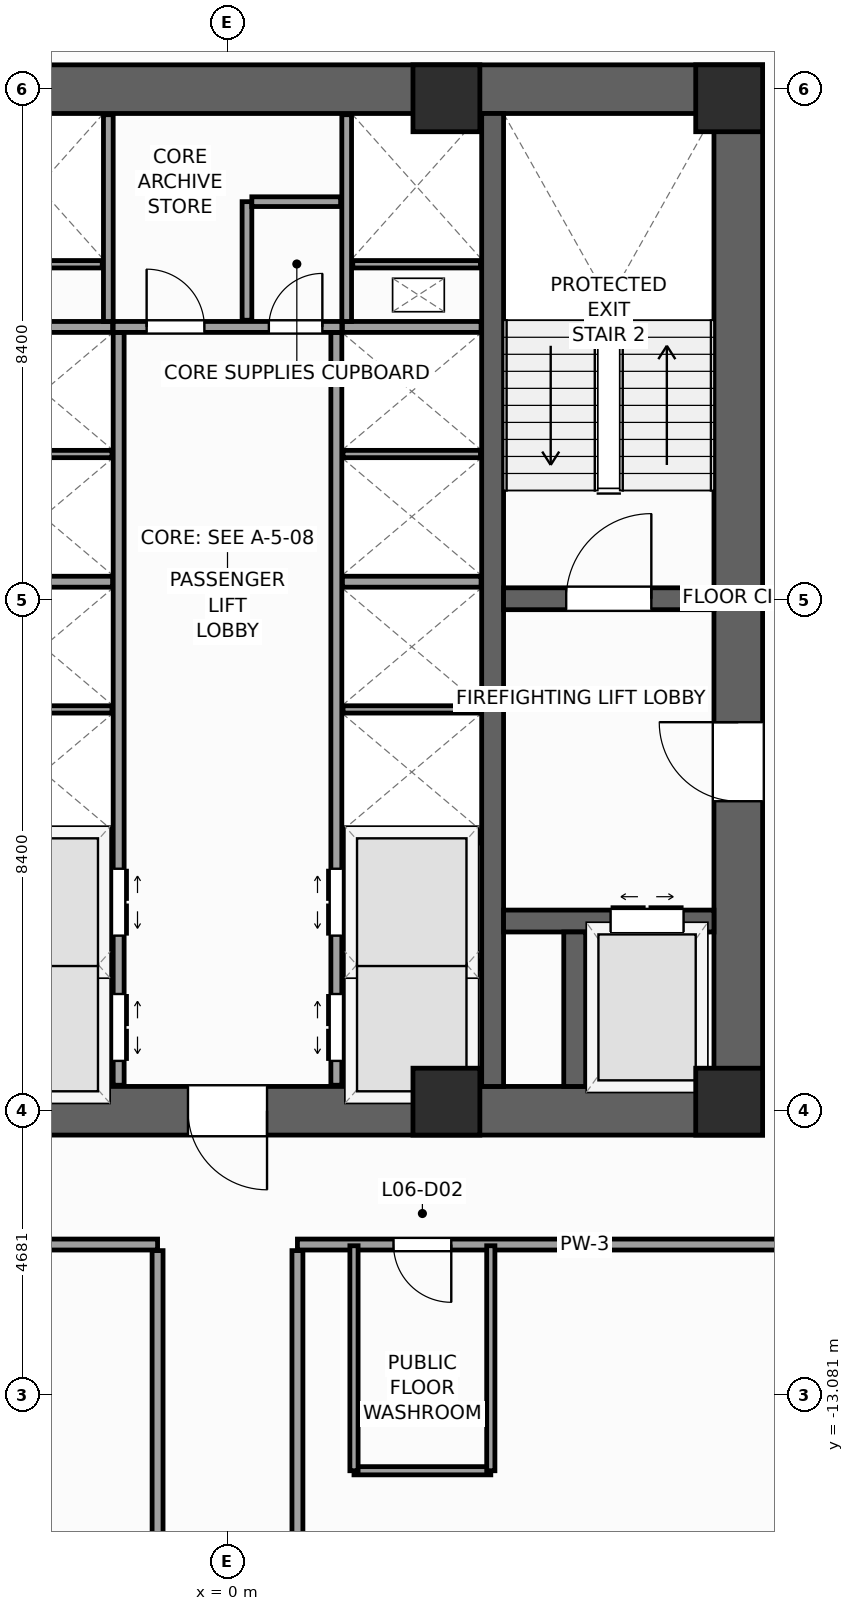
"""IFC4 building model, lengths in metres.
Left out: names, types, materials, properties, quantities, classifications, styles, units other than length and angle.
Written with IfcOpenShell. Run it as: python <this file> out.ifc"""

import sys

from ifc_helpers import new_model, si_unit, direction, frame, frame_2d, origin, origin_2d, place, context, subcontext, project, spatial, rectangle, extrude, source, transform, mapped, element, fill, save


model = new_model("IFC4")
c1 = context("Model", 3, precision=1e-05, world=origin(), true_north=direction((0.0, 1.0)))
c2 = subcontext(c1, "Body", "Model", "MODEL_VIEW")
j1 = project(units=[si_unit("LENGTHUNIT", "METRE"), si_unit("PLANEANGLEUNIT", "RADIAN")], contexts=[c1])
p1 = place(None, origin())
s1 = spatial("IfcSite", under=j1, at=p1, CompositionType="ELEMENT")
p2 = place(p1, origin())
s2 = spatial("IfcBuilding", under=s1, at=p2, CompositionType="ELEMENT")
p3 = place(p2, frame((0.0, 0.0, 30.0)))
s3 = spatial("IfcBuildingStorey", under=s2, at=p3, CompositionType="ELEMENT", Elevation=30.0)
p4 = place(p3, frame((-8.8, -8.4, 0.0), z_axis=(0.0, 0.0, 1.0), x_axis=(1.0, 0.0, 0.0)))
e1 = element("IfcWall", 1, at=p4, inside=s3, PredefinedType="SHEAR", context=c2, shape_type="SweptSolid", body=[
    extrude(rectangle(XDim=17.6, YDim=0.8, at=frame_2d((8.8, 0.0))), origin(), (0.0, 0.0, 1.0), 4.0),
])
p5 = place(p4, frame((8.15, 0.0, 0.0)))
e2 = element("IfcOpeningElement", 2, at=p5, cuts=e1, PredefinedType="OPENING", context=c2, shape_type="SweptSolid", body=[
    extrude(rectangle(XDim=1.3, YDim=2.2, at=frame_2d((0.65, 1.1))), frame((0.0, 0.41, 0.0), z_axis=(0.0, -1.0, 0.0), x_axis=(1.0, 0.0, 0.0)), (0.0, 0.0, 1.0), 0.82),
])
p6 = place(p3, frame((-8.8, 8.4, 0.0), z_axis=(0.0, 0.0, 1.0), x_axis=(1.0, 0.0, 0.0)))
e3 = element("IfcWall", 3, at=p6, inside=s3, PredefinedType="SHEAR", context=c2, shape_type="SweptSolid", body=[
    extrude(rectangle(XDim=17.6, YDim=0.8, at=frame_2d((8.8, 0.0))), origin(), (0.0, 0.0, 1.0), 4.0),
])
p7 = place(p3, frame((8.4, -8.0, 0.0), z_axis=(0.0, 0.0, 1.0), x_axis=(0.0, 1.0, 0.0)))
e4 = element("IfcWall", 4, at=p7, inside=s3, PredefinedType="SHEAR", context=c2, shape_type="SweptSolid", body=[
    extrude(rectangle(XDim=16.0, YDim=0.8, at=frame_2d((8.0, 0.0))), origin(), (0.0, 0.0, 1.0), 4.0),
])
p8 = place(p7, frame((4.69, 0.0, 0.0)))
e5 = element("IfcOpeningElement", 5, at=p8, cuts=e4, PredefinedType="OPENING", context=c2, shape_type="SweptSolid", body=[
    extrude(rectangle(XDim=1.3, YDim=2.2, at=frame_2d((0.65, 1.1))), frame((0.0, 0.41, 0.0), z_axis=(0.0, -1.0, 0.0), x_axis=(1.0, 0.0, 0.0)), (0.0, 0.0, 1.0), 0.82),
])
p9 = place(p3, frame((4.36, -8.0, 0.0), z_axis=(0.0, 0.0, 1.0), x_axis=(0.0, 1.0, 0.0)))
e6 = element("IfcWall", 6, at=p9, inside=s3, PredefinedType="SHEAR", context=c2, shape_type="SweptSolid", body=[
    extrude(rectangle(XDim=16.0, YDim=0.36, at=frame_2d((8.0, 0.0))), origin(), (0.0, 0.0, 1.0), 4.0),
])
p10 = place(p3, frame((4.54, 0.02, 0.0), z_axis=(0.0, 0.0, 1.0), x_axis=(1.0, 0.0, 0.0)))
e7 = element("IfcWall", 7, at=p10, inside=s3, PredefinedType="SHEAR", context=c2, shape_type="SweptSolid", body=[
    extrude(rectangle(XDim=3.46, YDim=0.36, at=frame_2d((1.73, 0.0))), origin(), (0.0, 0.0, 1.0), 4.0),
])
p11 = place(p10, frame((1.03, 0.0, 0.0)))
e8 = element("IfcOpeningElement", 8, at=p11, cuts=e7, PredefinedType="OPENING", context=c2, shape_type="SweptSolid", body=[
    extrude(rectangle(XDim=1.4, YDim=2.2, at=frame_2d((0.7, 1.1))), frame((0.0, 0.19, 0.0), z_axis=(0.0, -1.0, 0.0), x_axis=(1.0, 0.0, 0.0)), (0.0, 0.0, 1.0), 0.38),
])
p12 = place(p3, frame((4.54, -5.28, 0.0), z_axis=(0.0, 0.0, 1.0), x_axis=(1.0, 0.0, 0.0)))
e9 = element("IfcWall", 9, at=p12, inside=s3, PredefinedType="SHEAR", context=c2, shape_type="SweptSolid", body=[
    extrude(rectangle(XDim=3.46, YDim=0.36, at=frame_2d((1.73, 0.0))), origin(), (0.0, 0.0, 1.0), 4.0),
])
p13 = place(p12, frame((1.76, 0.0, 0.0)))
e10 = element("IfcOpeningElement", 10, at=p13, cuts=e9, PredefinedType="OPENING", context=c2, shape_type="SweptSolid", body=[
    extrude(rectangle(XDim=1.2, YDim=2.25, at=frame_2d((0.6, 1.125))), frame((0.0, 0.19, 0.0), z_axis=(0.0, -1.0, 0.0), x_axis=(1.0, 0.0, 0.0)), (0.0, 0.0, 1.0), 0.38),
])
p14 = place(p3, frame((5.71, -8.0, 0.0), z_axis=(0.0, 0.0, 1.0), x_axis=(0.0, 1.0, 0.0)))
e11 = element("IfcWall", 11, at=p14, inside=s3, PredefinedType="SHEAR", context=c2, shape_type="SweptSolid", body=[
    extrude(rectangle(XDim=2.54, YDim=0.36, at=frame_2d((1.27, 0.0))), origin(), (0.0, 0.0, 1.0), 4.0),
])
m1 = source(origin(), c2, "Body", "SweptSolid", [
    extrude(rectangle(XDim=1.1, YDim=1.1, at=origin_2d()), origin(), (0.0, 0.0, 1.0), 4.0),
])
for number, where, z_axis, x_axis in (
    (12, (8.25, -8.25, 0.0), (0.0, 0.0, 1.0), (1.0, 0.0, 0.0)),
    (13, (8.25, 8.25, 0.0), (0.0, 0.0, 1.0), (1.0, 0.0, 0.0)),
    (14, (3.6, -8.25, 0.0), (0.0, 0.0, 1.0), (1.0, 0.0, 0.0)),
    (15, (3.6, 8.25, 0.0), (0.0, 0.0, 1.0), (1.0, 0.0, 0.0)),
):
    element("IfcColumn", number, at=place(p3, frame(where, z_axis=z_axis, x_axis=x_axis)), inside=s3, PredefinedType="PILASTER", context=c2, shape_type="MappedRepresentation", body=[
        mapped(m1, transform((0.0, 0.0, 0.0), scale=1.0)),
    ])
p15 = place(p3, frame((-1.79, -7.98, 0.0), z_axis=(0.0, 0.0, 1.0), x_axis=(0.0, 1.0, 0.0)))
e16 = element("IfcWall", 16, at=p15, inside=s3, PredefinedType="PARTITIONING", context=c2, shape_type="SweptSolid", body=[
    extrude(rectangle(XDim=12.38, YDim=0.18, at=frame_2d((6.19, 0.0))), origin(), (0.0, 0.0, 1.0), 3.72),
])
p16 = place(p15, frame((0.4, 0.0, 0.0)))
e17 = element("IfcOpeningElement", 17, at=p16, cuts=e16, PredefinedType="OPENING", context=c2, shape_type="SweptSolid", body=[
    extrude(rectangle(XDim=1.1, YDim=2.2, at=frame_2d((0.55, 1.1))), frame((0.0, 0.1, 0.0), z_axis=(0.0, -1.0, 0.0), x_axis=(1.0, 0.0, 0.0)), (0.0, 0.0, 1.0), 0.2),
])
p17 = place(p15, frame((2.46, 0.0, 0.0)))
e18 = element("IfcOpeningElement", 18, at=p17, cuts=e16, PredefinedType="OPENING", context=c2, shape_type="SweptSolid", body=[
    extrude(rectangle(XDim=1.1, YDim=2.2, at=frame_2d((0.55, 1.1))), frame((0.0, 0.1, 0.0), z_axis=(0.0, -1.0, 0.0), x_axis=(1.0, 0.0, 0.0)), (0.0, 0.0, 1.0), 0.2),
])
p18 = place(p3, frame((1.79, -7.98, 0.0), z_axis=(0.0, 0.0, 1.0), x_axis=(0.0, 1.0, 0.0)))
e19 = element("IfcWall", 19, at=p18, inside=s3, PredefinedType="PARTITIONING", context=c2, shape_type="SweptSolid", body=[
    extrude(rectangle(XDim=12.38, YDim=0.18, at=frame_2d((6.19, 0.0))), origin(), (0.0, 0.0, 1.0), 3.72),
])
p19 = place(p18, frame((0.4, 0.0, 0.0)))
e20 = element("IfcOpeningElement", 20, at=p19, cuts=e19, PredefinedType="OPENING", context=c2, shape_type="SweptSolid", body=[
    extrude(rectangle(XDim=1.1, YDim=2.2, at=frame_2d((0.55, 1.1))), frame((0.0, 0.1, 0.0), z_axis=(0.0, -1.0, 0.0), x_axis=(1.0, 0.0, 0.0)), (0.0, 0.0, 1.0), 0.2),
])
p20 = place(p18, frame((2.46, 0.0, 0.0)))
e21 = element("IfcOpeningElement", 21, at=p20, cuts=e19, PredefinedType="OPENING", context=c2, shape_type="SweptSolid", body=[
    extrude(rectangle(XDim=1.1, YDim=2.2, at=frame_2d((0.55, 1.1))), frame((0.0, 0.1, 0.0), z_axis=(0.0, -1.0, 0.0), x_axis=(1.0, 0.0, 0.0)), (0.0, 0.0, 1.0), 0.2),
])
p21 = place(p3, frame((-1.88, 4.49, 0.0), z_axis=(0.0, 0.0, 1.0), x_axis=(1.0, 0.0, 0.0)))
e22 = element("IfcWall", 22, at=p21, inside=s3, PredefinedType="PARTITIONING", context=c2, shape_type="SweptSolid", body=[
    extrude(rectangle(XDim=3.76, YDim=0.18, at=frame_2d((1.88, 0.0))), origin(), (0.0, 0.0, 1.0), 3.72),
])
p22 = place(p21, frame((0.55, 0.0, 0.0)))
e23 = element("IfcOpeningElement", 23, at=p22, cuts=e22, PredefinedType="OPENING", context=c2, shape_type="SweptSolid", body=[
    extrude(rectangle(XDim=0.95, YDim=2.1, at=frame_2d((0.475, 1.05))), frame((0.0, 0.1, 0.0), z_axis=(0.0, -1.0, 0.0), x_axis=(1.0, 0.0, 0.0)), (0.0, 0.0, 1.0), 0.2),
])
p23 = place(p21, frame((2.56, 0.0, 0.0)))
e24 = element("IfcOpeningElement", 24, at=p23, cuts=e22, PredefinedType="OPENING", context=c2, shape_type="SweptSolid", body=[
    extrude(rectangle(XDim=0.88, YDim=2.1, at=frame_2d((0.44, 1.05))), frame((0.0, 0.1, 0.0), z_axis=(0.0, -1.0, 0.0), x_axis=(1.0, 0.0, 0.0)), (0.0, 0.0, 1.0), 0.2),
])
for number, where, z_axis, x_axis in (
    (25, (-4.17, -3.9, 0.0), (0.0, 0.0, 1.0), (1.0, 0.0, 0.0)),
    (26, (1.89, -3.9, 0.0), (0.0, 0.0, 1.0), (1.0, 0.0, 0.0)),
    (27, (-4.17, 0.3, 0.0), (0.0, 0.0, 1.0), (1.0, 0.0, 0.0)),
    (28, (1.89, 0.3, 0.0), (0.0, 0.0, 1.0), (1.0, 0.0, 0.0)),
    (29, (-4.17, 4.49, 0.0), (0.0, 0.0, 1.0), (1.0, 0.0, 0.0)),
    (30, (1.89, 4.49, 0.0), (0.0, 0.0, 1.0), (1.0, 0.0, 0.0)),
):
    element("IfcWall", number, at=place(p3, frame(where, z_axis=z_axis, x_axis=x_axis)), inside=s3, PredefinedType="PARTITIONING", context=c2, shape_type="SweptSolid", body=[
        extrude(rectangle(XDim=2.28, YDim=0.18, at=frame_2d((1.14, 0.0))), origin(), (0.0, 0.0, 1.0), 3.72),
    ])
for number, where, z_axis, x_axis in (
    (31, (-4.16, -6.0, 0.0), (0.0, 0.0, 1.0), (1.0, 0.0, 0.0)),
    (32, (1.9, -6.0, 0.0), (0.0, 0.0, 1.0), (1.0, 0.0, 0.0)),
    (33, (-4.16, -1.8, 0.0), (0.0, 0.0, 1.0), (1.0, 0.0, 0.0)),
    (34, (1.9, -1.8, 0.0), (0.0, 0.0, 1.0), (1.0, 0.0, 0.0)),
    (35, (-4.16, 2.4, 0.0), (0.0, 0.0, 1.0), (1.0, 0.0, 0.0)),
    (36, (1.9, 2.4, 0.0), (0.0, 0.0, 1.0), (1.0, 0.0, 0.0)),
):
    element("IfcWall", number, at=place(p3, frame(where, z_axis=z_axis, x_axis=x_axis)), inside=s3, PredefinedType="PARTITIONING", context=c2, shape_type="SweptSolid", body=[
        extrude(rectangle(XDim=2.26, YDim=0.12, at=frame_2d((1.13, 0.0))), origin(), (0.0, 0.0, 1.0), 3.72),
    ])
for number, where, z_axis, x_axis in (
    (37, (-1.96, 4.58, 0.0), (0.0, 0.0, 1.0), (0.0, 1.0, 0.0)),
    (38, (1.96, 4.58, 0.0), (0.0, 0.0, 1.0), (0.0, 1.0, 0.0)),
):
    element("IfcWall", number, at=place(p3, frame(where, z_axis=z_axis, x_axis=x_axis)), inside=s3, PredefinedType="PARTITIONING", context=c2, shape_type="SweptSolid", body=[
        extrude(rectangle(XDim=3.4, YDim=0.16, at=frame_2d((1.7, 0.0))), origin(), (0.0, 0.0, 1.0), 3.72),
    ])
for number, where, z_axis, x_axis in (
    (39, (-4.16, 5.52, 0.0), (0.0, 0.0, 1.0), (1.0, 0.0, 0.0)),
    (40, (2.06, 5.52, 0.0), (0.0, 0.0, 1.0), (1.0, 0.0, 0.0)),
):
    element("IfcWall", number, at=place(p3, frame(where, z_axis=z_axis, x_axis=x_axis)), inside=s3, PredefinedType="PARTITIONING", context=c2, shape_type="SweptSolid", body=[
        extrude(rectangle(XDim=2.1, YDim=0.12, at=frame_2d((1.05, 0.0))), origin(), (0.0, 0.0, 1.0), 3.72),
    ])
p24 = place(p3, frame((0.32, 4.6, 0.0), z_axis=(0.0, 0.0, 1.0), x_axis=(0.0, 1.0, 0.0)))
e41 = element("IfcWall", 41, at=p24, inside=s3, PredefinedType="PARTITIONING", context=c2, shape_type="SweptSolid", body=[
    extrude(rectangle(XDim=1.95, YDim=0.16, at=frame_2d((0.975, 0.0))), origin(), (0.0, 0.0, 1.0), 3.72),
])
p25 = place(p3, frame((0.4, 6.55, 0.0), z_axis=(0.0, 0.0, 1.0), x_axis=(1.0, 0.0, 0.0)))
e42 = element("IfcWall", 42, at=p25, inside=s3, PredefinedType="PARTITIONING", context=c2, shape_type="SweptSolid", body=[
    extrude(rectangle(XDim=1.46, YDim=0.16, at=frame_2d((0.73, 0.0))), origin(), (0.0, 0.0, 1.0), 3.72),
])
p26 = place(p3, frame((-10.6, -10.6, 0.0), z_axis=(0.0, 0.0, 1.0), x_axis=(1.0, 0.0, 0.0)))
e43 = element("IfcWall", 43, at=p26, inside=s3, PredefinedType="PARTITIONING", context=c2, shape_type="SweptSolid", body=[
    extrude(rectangle(XDim=9.45, YDim=0.18, at=frame_2d((4.725, 0.0))), origin(), (0.0, 0.0, 1.0), 3.72),
])
p27 = place(p26, frame((1.455, 0.0, 0.0)))
e44 = element("IfcOpeningElement", 44, at=p27, cuts=e43, PredefinedType="OPENING", context=c2, shape_type="SweptSolid", body=[
    extrude(rectangle(XDim=0.95, YDim=2.1, at=frame_2d((0.475, 1.05))), frame((0.0, 0.1, 0.0), z_axis=(0.0, -1.0, 0.0), x_axis=(1.0, 0.0, 0.0)), (0.0, 0.0, 1.0), 0.2),
])
p28 = place(p26, frame((4.154, 0.0, 0.0)))
e45 = element("IfcOpeningElement", 45, at=p28, cuts=e43, PredefinedType="OPENING", context=c2, shape_type="SweptSolid", body=[
    extrude(rectangle(XDim=0.95, YDim=2.1, at=frame_2d((0.475, 1.05))), frame((0.0, 0.1, 0.0), z_axis=(0.0, -1.0, 0.0), x_axis=(1.0, 0.0, 0.0)), (0.0, 0.0, 1.0), 0.2),
])
p29 = place(p3, frame((1.15, -10.6, 0.0), z_axis=(0.0, 0.0, 1.0), x_axis=(1.0, 0.0, 0.0)))
e46 = element("IfcWall", 46, at=p29, inside=s3, PredefinedType="PARTITIONING", context=c2, shape_type="SweptSolid", body=[
    extrude(rectangle(XDim=9.45, YDim=0.18, at=frame_2d((4.725, 0.0))), origin(), (0.0, 0.0, 1.0), 3.72),
])
p30 = place(p29, frame((1.58, 0.0, 0.0)))
e47 = element("IfcOpeningElement", 47, at=p30, cuts=e46, PredefinedType="OPENING", context=c2, shape_type="SweptSolid", body=[
    extrude(rectangle(XDim=0.95, YDim=2.1, at=frame_2d((0.475, 1.05))), frame((0.0, 0.1, 0.0), z_axis=(0.0, -1.0, 0.0), x_axis=(1.0, 0.0, 0.0)), (0.0, 0.0, 1.0), 0.2),
])
for number, where, z_axis, x_axis in (
    (48, (-1.15, -28.685, 0.0), (0.0, 0.0, 1.0), (0.0, 1.0, 0.0)),
    (49, (1.15, -28.685, 0.0), (0.0, 0.0, 1.0), (0.0, 1.0, 0.0)),
):
    element("IfcWall", number, at=place(p3, frame(where, z_axis=z_axis, x_axis=x_axis)), inside=s3, PredefinedType="PARTITIONING", context=c2, shape_type="SweptSolid", body=[
        extrude(rectangle(XDim=17.985, YDim=0.18, at=frame_2d((8.993, 0.0))), origin(), (0.0, 0.0, 1.0), 3.72),
    ])
p31 = place(p3, frame((2.08, -14.32, 0.0), z_axis=(0.0, 0.0, 1.0), x_axis=(1.0, 0.0, 0.0)))
e50 = element("IfcWall", 50, at=p31, inside=s3, PredefinedType="PARTITIONING", context=c2, shape_type="SweptSolid", body=[
    extrude(rectangle(XDim=2.25, YDim=0.135, at=frame_2d((1.125, 0.0))), origin(), (0.0, 0.0, 1.0), 3.72),
])
for number, where, z_axis, x_axis in (
    (51, (4.33, -14.32, 0.0), (0.0, 0.0, 1.0), (0.0, 1.0, 0.0)),
    (52, (2.08, -14.32, 0.0), (0.0, 0.0, 1.0), (0.0, 1.0, 0.0)),
):
    element("IfcWall", number, at=place(p3, frame(where, z_axis=z_axis, x_axis=x_axis)), inside=s3, PredefinedType="PARTITIONING", context=c2, shape_type="SweptSolid", body=[
        extrude(rectangle(XDim=3.7, YDim=0.135, at=frame_2d((1.85, 0.0))), origin(), (0.0, 0.0, 1.0), 3.72),
    ])
m2 = source(origin(), c2, "Body", "SweptSolid", [
    extrude(rectangle(XDim=1.4, YDim=2.2, at=frame_2d((0.7, 1.1))), frame((0.0, 0.025, 0.0), z_axis=(0.0, -1.0, 0.0), x_axis=(1.0, 0.0, 0.0)), (0.0, 0.0, 1.0), 0.05),
])
p32 = place(p11, origin())
e53 = element("IfcDoor", 53, at=p32, inside=s3, OperationType="SINGLE_SWING_RIGHT", PredefinedType="DOOR", context=c2, shape_type="MappedRepresentation", body=[
    mapped(m2, transform((0.0, 0.0, 0.0), scale=1.0)),
])
fill(e8, e53)
m3 = source(origin(), c2, "Body", "SweptSolid", [
    extrude(rectangle(XDim=1.3, YDim=2.2, at=frame_2d((0.65, 1.1))), frame((0.0, 0.025, 0.0), z_axis=(0.0, -1.0, 0.0), x_axis=(1.0, 0.0, 0.0)), (0.0, 0.0, 1.0), 0.05),
])
p33 = place(p8, origin())
e54 = element("IfcDoor", 54, at=p33, inside=s3, OperationType="SINGLE_SWING_RIGHT", PredefinedType="DOOR", context=c2, shape_type="MappedRepresentation", body=[
    mapped(m3, transform((0.0, 0.0, 0.0), scale=1.0)),
])
fill(e5, e54)
p34 = place(p5, frame((1.3, 0.0, 0.0), z_axis=(0.0, 0.0, 1.0), x_axis=(-1.0, 0.0, 0.0)))
e55 = element("IfcDoor", 55, at=p34, inside=s3, OperationType="SINGLE_SWING_RIGHT", PredefinedType="DOOR", context=c2, shape_type="MappedRepresentation", body=[
    mapped(m3, transform((0.0, 0.0, 0.0), scale=1.0)),
])
fill(e2, e55)
m4 = source(origin(), c2, "Body", "SweptSolid", [
    extrude(rectangle(XDim=1.2, YDim=2.25, at=frame_2d((0.6, 1.125))), frame((0.0, 0.025, 0.0), z_axis=(0.0, -1.0, 0.0), x_axis=(1.0, 0.0, 0.0)), (0.0, 0.0, 1.0), 0.05),
])
p35 = place(p13, origin())
e56 = element("IfcDoor", 56, at=p35, inside=s3, OperationType="DOUBLE_DOOR_SLIDING", PredefinedType="DOOR", context=c2, shape_type="MappedRepresentation", body=[
    mapped(m4, transform((0.0, 0.0, 0.0), scale=1.0)),
])
fill(e10, e56)
m5 = source(origin(), c2, "Body", "SweptSolid", [
    extrude(rectangle(XDim=1.1, YDim=2.2, at=frame_2d((0.55, 1.1))), frame((0.0, 0.025, 0.0), z_axis=(0.0, -1.0, 0.0), x_axis=(1.0, 0.0, 0.0)), (0.0, 0.0, 1.0), 0.05),
])
p36 = place(p16, frame((1.1, 0.0, 0.0), z_axis=(0.0, 0.0, 1.0), x_axis=(-1.0, 0.0, 0.0)))
e57 = element("IfcDoor", 57, at=p36, inside=s3, OperationType="DOUBLE_DOOR_SLIDING", PredefinedType="DOOR", context=c2, shape_type="MappedRepresentation", body=[
    mapped(m5, transform((0.0, 0.0, 0.0), scale=1.0)),
])
fill(e17, e57)
p37 = place(p17, frame((1.1, 0.0, 0.0), z_axis=(0.0, 0.0, 1.0), x_axis=(-1.0, 0.0, 0.0)))
e58 = element("IfcDoor", 58, at=p37, inside=s3, OperationType="DOUBLE_DOOR_SLIDING", PredefinedType="DOOR", context=c2, shape_type="MappedRepresentation", body=[
    mapped(m5, transform((0.0, 0.0, 0.0), scale=1.0)),
])
fill(e18, e58)
p38 = place(p19, origin())
e59 = element("IfcDoor", 59, at=p38, inside=s3, OperationType="DOUBLE_DOOR_SLIDING", PredefinedType="DOOR", context=c2, shape_type="MappedRepresentation", body=[
    mapped(m5, transform((0.0, 0.0, 0.0), scale=1.0)),
])
fill(e20, e59)
p39 = place(p20, origin())
e60 = element("IfcDoor", 60, at=p39, inside=s3, OperationType="DOUBLE_DOOR_SLIDING", PredefinedType="DOOR", context=c2, shape_type="MappedRepresentation", body=[
    mapped(m5, transform((0.0, 0.0, 0.0), scale=1.0)),
])
fill(e21, e60)
m6 = source(origin(), c2, "Body", "SweptSolid", [
    extrude(rectangle(XDim=0.95, YDim=2.1, at=frame_2d((0.475, 1.05))), frame((0.0, 0.025, 0.0), z_axis=(0.0, -1.0, 0.0), x_axis=(1.0, 0.0, 0.0)), (0.0, 0.0, 1.0), 0.05),
])
p40 = place(p22, origin())
e61 = element("IfcDoor", 61, at=p40, inside=s3, OperationType="SINGLE_SWING_LEFT", PredefinedType="DOOR", context=c2, shape_type="MappedRepresentation", body=[
    mapped(m6, transform((0.0, 0.0, 0.0), scale=1.0)),
])
fill(e23, e61)
m7 = source(origin(), c2, "Body", "SweptSolid", [
    extrude(rectangle(XDim=0.88, YDim=2.1, at=frame_2d((0.44, 1.05))), frame((0.0, 0.025, 0.0), z_axis=(0.0, -1.0, 0.0), x_axis=(1.0, 0.0, 0.0)), (0.0, 0.0, 1.0), 0.05),
])
p41 = place(p23, origin())
e62 = element("IfcDoor", 62, at=p41, inside=s3, OperationType="SINGLE_SWING_RIGHT", PredefinedType="DOOR", context=c2, shape_type="MappedRepresentation", body=[
    mapped(m7, transform((0.0, 0.0, 0.0), scale=1.0)),
])
fill(e24, e62)
p42 = place(p30, frame((0.95, 0.0, 0.0), z_axis=(0.0, 0.0, 1.0), x_axis=(-1.0, 0.0, 0.0)))
e63 = element("IfcDoor", 63, at=p42, inside=s3, OperationType="SINGLE_SWING_RIGHT", PredefinedType="DOOR", context=c2, shape_type="MappedRepresentation", body=[
    mapped(m6, transform((0.0, 0.0, 0.0), scale=1.0)),
])
fill(e47, e63)
save(model, sys.argv[1])
